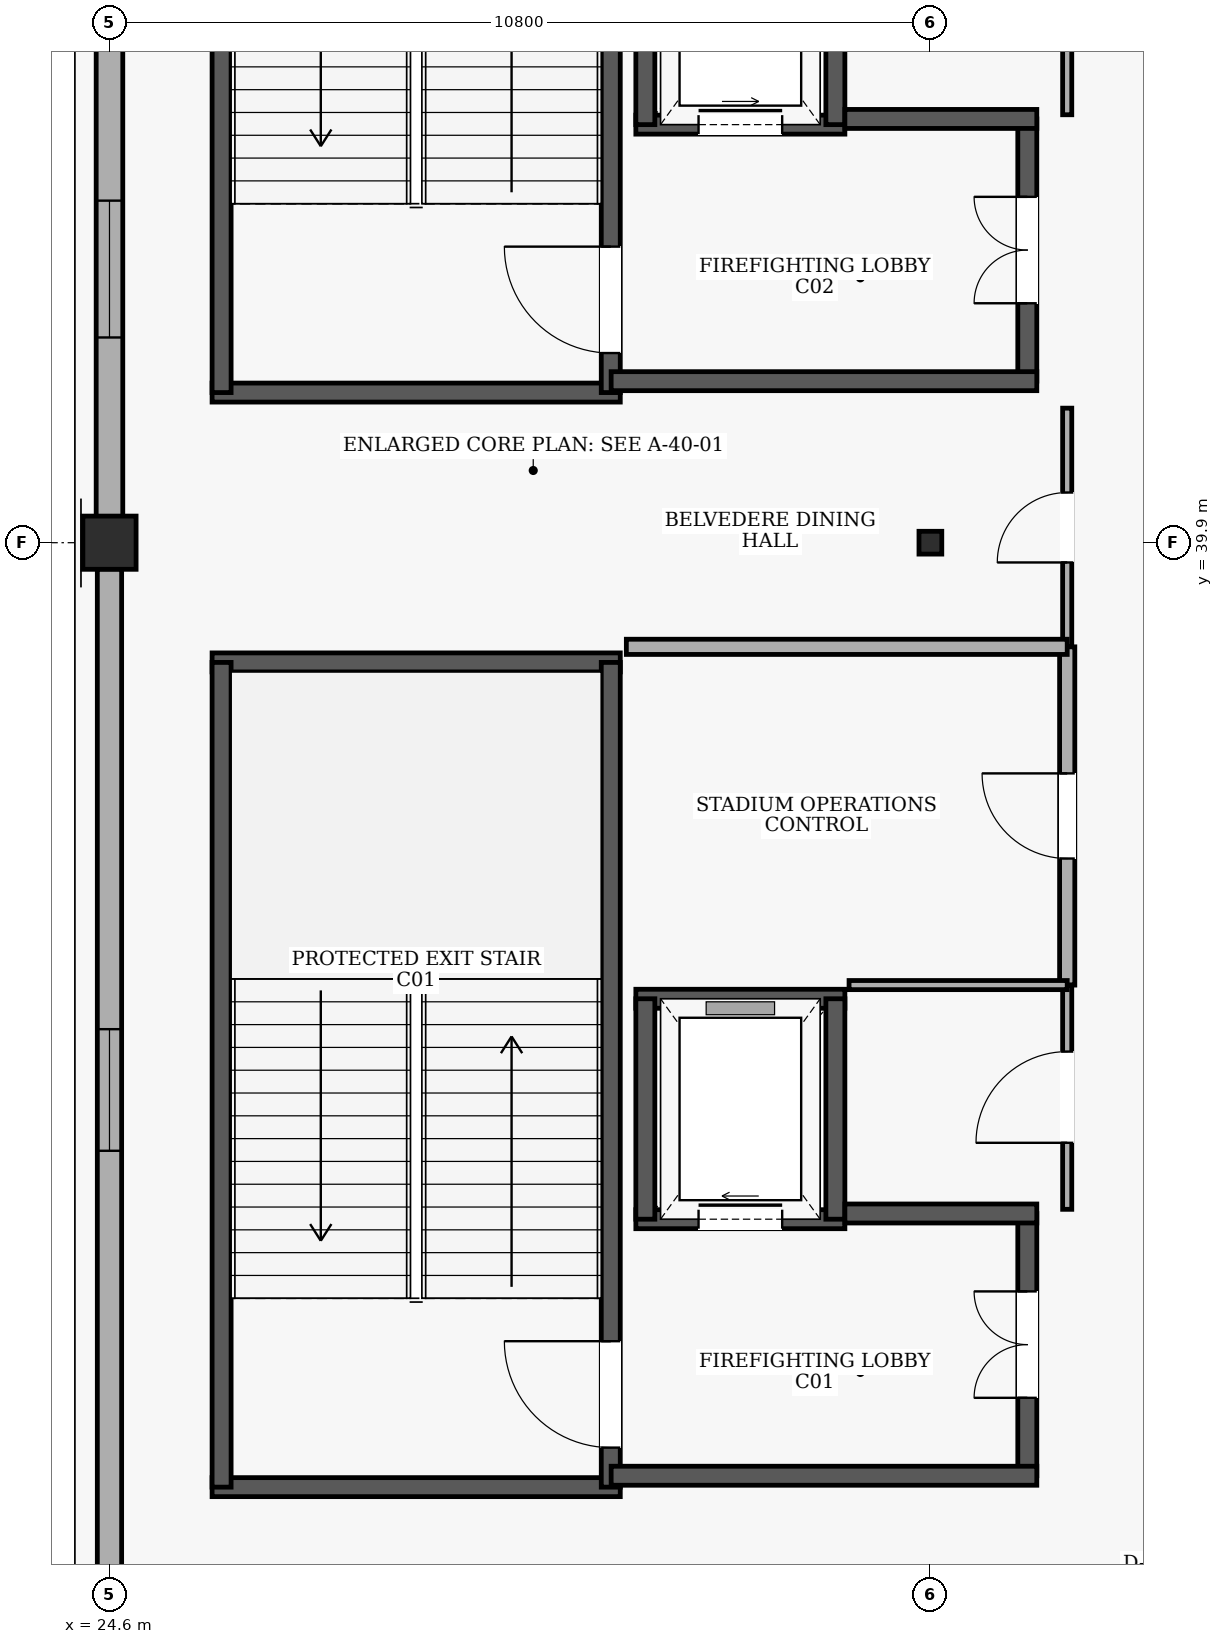
"""IFC4 building model, lengths in metres.
Left out: names, types, materials, properties, quantities, classifications, styles, units other than length and angle.
Written with IfcOpenShell. Run it as: python <this file> out.ifc"""

import sys

from ifc_helpers import new_model, si_unit, direction, frame, frame_2d, origin, origin_2d, place, context, subcontext, project, spatial, rectangle, hollow_rectangle, extrude, element, fill, save


model = new_model("IFC4")
c1 = context("Model", 3, precision=1e-05, world=origin(), true_north=direction((0.0, 1.0)))
c2 = subcontext(c1, "Body", "Model", "MODEL_VIEW")
j1 = project(units=[si_unit("LENGTHUNIT", "METRE"), si_unit("PLANEANGLEUNIT", "RADIAN")], contexts=[c1])
p1 = place(None, origin())
s1 = spatial("IfcSite", under=j1, at=p1, CompositionType="ELEMENT")
p2 = place(p1, origin())
s2 = spatial("IfcBuilding", under=s1, at=p2, CompositionType="ELEMENT")
p3 = place(p2, frame((0.0, 0.0, 24.6)))
s3 = spatial("IfcBuildingStorey", under=s2, at=p3, CompositionType="ELEMENT", Elevation=24.6)
p4 = place(p3, frame((24.6, 39.9, 0.0), z_axis=(0.0, 0.0, 1.0), x_axis=(1.0, 0.0, 0.0)))
e1 = element("IfcColumn", 1, at=p4, inside=s3, PredefinedType="COLUMN", context=c2, shape_type="SweptSolid", body=[
    extrude(rectangle(XDim=0.7, YDim=0.7, at=origin_2d()), origin(), (0.0, 0.0, 1.0), 4.8),
])
p5 = place(p3, frame((35.4, 39.9, 0.0), z_axis=(0.0, 0.0, 1.0), x_axis=(1.0, 0.0, 0.0)))
e2 = element("IfcColumn", 2, at=p5, inside=s3, PredefinedType="COLUMN", context=c2, shape_type="SweptSolid", body=[
    extrude(hollow_rectangle(XDim=0.3, YDim=0.3, WallThickness=0.016, at=origin_2d()), origin(), (0.0, 0.0, 1.0), 4.8),
])
p6 = place(p3, frame((24.6, 25.845, 0.0), z_axis=(0.0, 0.0, 1.0), x_axis=(0.0, 1.0, 0.0)))
e3 = element("IfcWall", 3, at=p6, inside=s3, PredefinedType="SOLIDWALL", context=c2, shape_type="SweptSolid", body=[
    extrude(rectangle(XDim=13.71, YDim=0.32, at=frame_2d((6.855, 0.0))), origin(), (0.0, 0.0, 1.0), 3.58),
])
p7 = place(p6, frame((6.055, 0.0, 0.9)))
e4 = element("IfcOpeningElement", 4, at=p7, cuts=e3, PredefinedType="OPENING", context=c2, shape_type="SweptSolid", body=[
    extrude(rectangle(XDim=1.6, YDim=1.5, at=frame_2d((0.8, 0.75))), frame((0.0, 0.17, 0.0), z_axis=(0.0, -1.0, 0.0), x_axis=(1.0, 0.0, 0.0)), (0.0, 0.0, 1.0), 0.34),
])
p8 = place(p3, frame((24.6, 40.245, 0.0), z_axis=(0.0, 0.0, 1.0), x_axis=(0.0, 1.0, 0.0)))
e5 = element("IfcWall", 5, at=p8, inside=s3, PredefinedType="SOLIDWALL", context=c2, shape_type="SweptSolid", body=[
    extrude(rectangle(XDim=6.51, YDim=0.35, at=frame_2d((3.255, 0.0))), origin(), (0.0, 0.0, 1.0), 3.88),
])
p9 = place(p8, frame((2.355, 0.0, 0.9)))
e6 = element("IfcOpeningElement", 6, at=p9, cuts=e5, PredefinedType="OPENING", context=c2, shape_type="SweptSolid", body=[
    extrude(rectangle(XDim=1.8, YDim=1.5, at=frame_2d((0.9, 0.75))), frame((0.0, 0.185, 0.0), z_axis=(0.0, -1.0, 0.0), x_axis=(1.0, 0.0, 0.0)), (0.0, 0.0, 1.0), 0.37),
])
for number, where, z_axis, x_axis in (
    (7, (25.95, 27.475, 0.0), (0.0, 0.0, 1.0), (1.0, 0.0, 0.0)),
    (8, (31.32, 38.325, 0.0), (0.0, 0.0, 1.0), (-1.0, 0.0, 0.0)),
):
    element("IfcWall", number, at=place(p3, frame(where, z_axis=z_axis, x_axis=x_axis)), inside=s3, PredefinedType="SHEAR", context=c2, shape_type="SweptSolid", body=[
        extrude(rectangle(XDim=5.37, YDim=0.25, at=frame_2d((2.685, 0.0))), origin(), (0.0, 0.0, 1.0), 4.5),
    ])
p10 = place(p3, frame((26.075, 27.475, 0.0), z_axis=(0.0, 0.0, 1.0), x_axis=(0.0, 1.0, 0.0)))
e9 = element("IfcWall", 9, at=p10, inside=s3, PredefinedType="SHEAR", context=c2, shape_type="SweptSolid", body=[
    extrude(rectangle(XDim=10.85, YDim=0.25, at=frame_2d((5.425, 0.0))), origin(), (0.0, 0.0, 1.0), 4.5),
])
p11 = place(p3, frame((31.195, 27.475, 0.0), z_axis=(0.0, 0.0, 1.0), x_axis=(0.0, 1.0, 0.0)))
e10 = element("IfcWall", 10, at=p11, inside=s3, PredefinedType="SHEAR", context=c2, shape_type="SweptSolid", body=[
    extrude(rectangle(XDim=10.85, YDim=0.25, at=frame_2d((5.425, 0.0))), origin(), (0.0, 0.0, 1.0), 4.5),
])
p12 = place(p11, frame((0.52, 0.0, 0.0)))
e11 = element("IfcOpeningElement", 11, at=p12, cuts=e10, PredefinedType="OPENING", context=c2, shape_type="SweptSolid", body=[
    extrude(rectangle(XDim=1.4, YDim=2.15, at=frame_2d((0.7, 1.075))), frame((0.0, 0.135, 0.0), z_axis=(0.0, -1.0, 0.0), x_axis=(1.0, 0.0, 0.0)), (0.0, 0.0, 1.0), 0.27),
])
p13 = place(p3, frame((25.95, 41.875, 0.0), z_axis=(0.0, 0.0, 1.0), x_axis=(1.0, 0.0, 0.0)))
e12 = element("IfcWall", 12, at=p13, inside=s3, PredefinedType="SHEAR", context=c2, shape_type="SweptSolid", body=[
    extrude(rectangle(XDim=5.37, YDim=0.25, at=frame_2d((2.685, 0.0))), origin(), (0.0, 0.0, 1.0), 4.5),
])
p14 = place(p3, frame((26.075, 41.875, 0.0), z_axis=(0.0, 0.0, 1.0), x_axis=(0.0, 1.0, 0.0)))
e13 = element("IfcWall", 13, at=p14, inside=s3, PredefinedType="SHEAR", context=c2, shape_type="SweptSolid", body=[
    extrude(rectangle(XDim=10.85, YDim=0.25, at=frame_2d((5.425, 0.0))), origin(), (0.0, 0.0, 1.0), 4.5),
])
p15 = place(p3, frame((31.195, 41.875, 0.0), z_axis=(0.0, 0.0, 1.0), x_axis=(0.0, 1.0, 0.0)))
e14 = element("IfcWall", 14, at=p15, inside=s3, PredefinedType="SHEAR", context=c2, shape_type="SweptSolid", body=[
    extrude(rectangle(XDim=10.85, YDim=0.25, at=frame_2d((5.425, 0.0))), origin(), (0.0, 0.0, 1.0), 4.5),
])
p16 = place(p15, frame((0.52, 0.0, 0.0)))
e15 = element("IfcOpeningElement", 15, at=p16, cuts=e14, PredefinedType="OPENING", context=c2, shape_type="SweptSolid", body=[
    extrude(rectangle(XDim=1.4, YDim=2.15, at=frame_2d((0.7, 1.075))), frame((0.0, 0.135, 0.0), z_axis=(0.0, -1.0, 0.0), x_axis=(1.0, 0.0, 0.0)), (0.0, 0.0, 1.0), 0.27),
])
p17 = place(p3, frame((31.525, 31.0, 0.0), z_axis=(0.0, 0.0, 1.0), x_axis=(1.0, 0.0, 0.0)))
e16 = element("IfcWall", 16, at=p17, inside=s3, PredefinedType="SHEAR", context=c2, shape_type="SweptSolid", body=[
    extrude(rectangle(XDim=2.75, YDim=0.25, at=frame_2d((1.375, 0.0))), origin(), (0.0, 0.0, 1.0), 4.5),
])
p18 = place(p17, frame((0.825, 0.0, 0.0)))
e17 = element("IfcOpeningElement", 17, at=p18, cuts=e16, PredefinedType="OPENING", context=c2, shape_type="SweptSolid", body=[
    extrude(rectangle(XDim=1.1, YDim=2.15, at=frame_2d((0.55, 1.075))), frame((0.0, 0.135, 0.0), z_axis=(0.0, -1.0, 0.0), x_axis=(1.0, 0.0, 0.0)), (0.0, 0.0, 1.0), 0.27),
])
p19 = place(p3, frame((34.275, 33.9, 0.0), z_axis=(0.0, 0.0, 1.0), x_axis=(-1.0, 0.0, 0.0)))
e18 = element("IfcWall", 18, at=p19, inside=s3, PredefinedType="SHEAR", context=c2, shape_type="SweptSolid", body=[
    extrude(rectangle(XDim=2.75, YDim=0.25, at=frame_2d((1.375, 0.0))), origin(), (0.0, 0.0, 1.0), 4.5),
])
for number, where, z_axis, x_axis in (
    (19, (31.65, 33.9, 0.0), (0.0, 0.0, 1.0), (0.0, -1.0, 0.0)),
    (20, (34.15, 31.0, 0.0), (0.0, 0.0, 1.0), (0.0, 1.0, 0.0)),
):
    element("IfcWall", number, at=place(p3, frame(where, z_axis=z_axis, x_axis=x_axis)), inside=s3, PredefinedType="SHEAR", context=c2, shape_type="SweptSolid", body=[
        extrude(rectangle(XDim=2.9, YDim=0.25, at=frame_2d((1.45, 0.0))), origin(), (0.0, 0.0, 1.0), 4.5),
    ])
p20 = place(p3, frame((36.675, 27.625, 0.0), z_axis=(0.0, 0.0, 1.0), x_axis=(0.0, 1.0, 0.0)))
e21 = element("IfcWall", 21, at=p20, inside=s3, PredefinedType="SHEAR", context=c2, shape_type="SweptSolid", body=[
    extrude(rectangle(XDim=3.45, YDim=0.25, at=frame_2d((1.725, 0.0))), origin(), (0.0, 0.0, 1.0), 4.5),
])
p21 = place(p20, frame((1.025, 0.0, 0.0)))
e22 = element("IfcOpeningElement", 22, at=p21, cuts=e21, PredefinedType="OPENING", context=c2, shape_type="SweptSolid", body=[
    extrude(rectangle(XDim=1.4, YDim=2.15, at=frame_2d((0.7, 1.075))), frame((0.0, 0.135, 0.0), z_axis=(0.0, -1.0, 0.0), x_axis=(1.0, 0.0, 0.0)), (0.0, 0.0, 1.0), 0.27),
])
p22 = place(p3, frame((34.275, 31.075, 0.0), z_axis=(0.0, 0.0, 1.0), x_axis=(1.0, 0.0, 0.0)))
e23 = element("IfcWall", 23, at=p22, inside=s3, PredefinedType="SHEAR", context=c2, shape_type="SweptSolid", body=[
    extrude(rectangle(XDim=2.525, YDim=0.25, at=frame_2d((1.263, 0.0))), origin(), (0.0, 0.0, 1.0), 4.5),
])
p23 = place(p3, frame((31.2, 27.625, 0.0), z_axis=(0.0, 0.0, 1.0), x_axis=(1.0, 0.0, 0.0)))
e24 = element("IfcWall", 24, at=p23, inside=s3, PredefinedType="SHEAR", context=c2, shape_type="SweptSolid", body=[
    extrude(rectangle(XDim=5.6, YDim=0.25, at=frame_2d((2.8, 0.0))), origin(), (0.0, 0.0, 1.0), 4.5),
])
p24 = place(p3, frame((31.525, 45.4, 0.0), z_axis=(0.0, 0.0, 1.0), x_axis=(1.0, 0.0, 0.0)))
e25 = element("IfcWall", 25, at=p24, inside=s3, PredefinedType="SHEAR", context=c2, shape_type="SweptSolid", body=[
    extrude(rectangle(XDim=2.75, YDim=0.25, at=frame_2d((1.375, 0.0))), origin(), (0.0, 0.0, 1.0), 4.5),
])
p25 = place(p24, frame((0.825, 0.0, 0.0)))
e26 = element("IfcOpeningElement", 26, at=p25, cuts=e25, PredefinedType="OPENING", context=c2, shape_type="SweptSolid", body=[
    extrude(rectangle(XDim=1.1, YDim=2.15, at=frame_2d((0.55, 1.075))), frame((0.0, 0.135, 0.0), z_axis=(0.0, -1.0, 0.0), x_axis=(1.0, 0.0, 0.0)), (0.0, 0.0, 1.0), 0.27),
])
for number, where, z_axis, x_axis in (
    (27, (31.65, 48.3, 0.0), (0.0, 0.0, 1.0), (0.0, -1.0, 0.0)),
    (28, (34.15, 45.4, 0.0), (0.0, 0.0, 1.0), (0.0, 1.0, 0.0)),
):
    element("IfcWall", number, at=place(p3, frame(where, z_axis=z_axis, x_axis=x_axis)), inside=s3, PredefinedType="SHEAR", context=c2, shape_type="SweptSolid", body=[
        extrude(rectangle(XDim=2.9, YDim=0.25, at=frame_2d((1.45, 0.0))), origin(), (0.0, 0.0, 1.0), 4.5),
    ])
p26 = place(p3, frame((36.675, 42.025, 0.0), z_axis=(0.0, 0.0, 1.0), x_axis=(0.0, 1.0, 0.0)))
e29 = element("IfcWall", 29, at=p26, inside=s3, PredefinedType="SHEAR", context=c2, shape_type="SweptSolid", body=[
    extrude(rectangle(XDim=3.45, YDim=0.25, at=frame_2d((1.725, 0.0))), origin(), (0.0, 0.0, 1.0), 4.5),
])
p27 = place(p26, frame((1.025, 0.0, 0.0)))
e30 = element("IfcOpeningElement", 30, at=p27, cuts=e29, PredefinedType="OPENING", context=c2, shape_type="SweptSolid", body=[
    extrude(rectangle(XDim=1.4, YDim=2.15, at=frame_2d((0.7, 1.075))), frame((0.0, 0.135, 0.0), z_axis=(0.0, -1.0, 0.0), x_axis=(1.0, 0.0, 0.0)), (0.0, 0.0, 1.0), 0.27),
])
p28 = place(p3, frame((34.275, 45.475, 0.0), z_axis=(0.0, 0.0, 1.0), x_axis=(1.0, 0.0, 0.0)))
e31 = element("IfcWall", 31, at=p28, inside=s3, PredefinedType="SHEAR", context=c2, shape_type="SweptSolid", body=[
    extrude(rectangle(XDim=2.525, YDim=0.25, at=frame_2d((1.263, 0.0))), origin(), (0.0, 0.0, 1.0), 4.5),
])
p29 = place(p3, frame((31.2, 42.025, 0.0), z_axis=(0.0, 0.0, 1.0), x_axis=(1.0, 0.0, 0.0)))
e32 = element("IfcWall", 32, at=p29, inside=s3, PredefinedType="SHEAR", context=c2, shape_type="SweptSolid", body=[
    extrude(rectangle(XDim=5.6, YDim=0.25, at=frame_2d((2.8, 0.0))), origin(), (0.0, 0.0, 1.0), 4.5),
])
p30 = place(p3, frame((37.2, 38.53, 0.0), z_axis=(0.0, 0.0, 1.0), x_axis=(0.0, 1.0, 0.0)))
e33 = element("IfcWall", 33, at=p30, inside=s3, PredefinedType="PARTITIONING", context=c2, shape_type="SweptSolid", body=[
    extrude(rectangle(XDim=3.14, YDim=0.12, at=frame_2d((1.57, 0.0))), origin(), (0.0, 0.0, 1.0), 4.5),
])
p31 = place(p30, frame((1.11, 0.0, 0.0)))
e34 = element("IfcOpeningElement", 34, at=p31, cuts=e33, PredefinedType="OPENING", context=c2, shape_type="SweptSolid", body=[
    extrude(rectangle(XDim=0.92, YDim=2.1, at=frame_2d((0.46, 1.05))), frame((0.0, 0.07, 0.0), z_axis=(0.0, -1.0, 0.0), x_axis=(1.0, 0.0, 0.0)), (0.0, 0.0, 1.0), 0.14),
])
p32 = place(p3, frame((37.2, 34.08, 0.0), z_axis=(0.0, 0.0, 1.0), x_axis=(0.0, 1.0, 0.0)))
e35 = element("IfcWall", 35, at=p32, inside=s3, PredefinedType="PARTITIONING", context=c2, shape_type="SweptSolid", body=[
    extrude(rectangle(XDim=4.45, YDim=0.2, at=frame_2d((2.225, 0.0))), origin(), (0.0, 0.0, 1.0), 4.5),
])
p33 = place(p32, frame((1.665, 0.0, 0.0)))
e36 = element("IfcOpeningElement", 36, at=p33, cuts=e35, PredefinedType="OPENING", context=c2, shape_type="SweptSolid", body=[
    extrude(rectangle(XDim=1.12, YDim=2.15, at=frame_2d((0.56, 1.075))), frame((0.0, 0.11, 0.0), z_axis=(0.0, -1.0, 0.0), x_axis=(1.0, 0.0, 0.0)), (0.0, 0.0, 1.0), 0.22),
])
p34 = place(p3, frame((37.2, 38.53, 0.0), z_axis=(0.0, 0.0, 1.0), x_axis=(-1.0, 0.0, 0.0)))
e37 = element("IfcWall", 37, at=p34, inside=s3, PredefinedType="PARTITIONING", context=c2, shape_type="SweptSolid", body=[
    extrude(rectangle(XDim=5.8, YDim=0.2, at=frame_2d((2.9, 0.0))), origin(), (0.0, 0.0, 1.0), 4.5),
])
p35 = place(p3, frame((37.2, 31.13, 0.0), z_axis=(0.0, 0.0, 1.0), x_axis=(0.0, 1.0, 0.0)))
e38 = element("IfcWall", 38, at=p35, inside=s3, PredefinedType="PARTITIONING", context=c2, shape_type="SweptSolid", body=[
    extrude(rectangle(XDim=2.95, YDim=0.12, at=frame_2d((1.475, 0.0))), origin(), (0.0, 0.0, 1.0), 4.5),
])
p36 = place(p35, frame((0.875, 0.0, 0.0)))
e39 = element("IfcOpeningElement", 39, at=p36, cuts=e38, PredefinedType="OPENING", context=c2, shape_type="SweptSolid", body=[
    extrude(rectangle(XDim=1.2, YDim=2.15, at=frame_2d((0.6, 1.075))), frame((0.0, 0.07, 0.0), z_axis=(0.0, -1.0, 0.0), x_axis=(1.0, 0.0, 0.0)), (0.0, 0.0, 1.0), 0.14),
])
p37 = place(p3, frame((37.2, 34.08, 0.0), z_axis=(0.0, 0.0, 1.0), x_axis=(-1.0, 0.0, 0.0)))
e40 = element("IfcWall", 40, at=p37, inside=s3, PredefinedType="PARTITIONING", context=c2, shape_type="SweptSolid", body=[
    extrude(rectangle(XDim=2.87, YDim=0.12, at=frame_2d((1.435, 0.0))), origin(), (0.0, 0.0, 1.0), 4.5),
])
p38 = place(p3, frame((37.2, 45.53, 0.0), z_axis=(0.0, 0.0, 1.0), x_axis=(0.0, 1.0, 0.0)))
e41 = element("IfcWall", 41, at=p38, inside=s3, PredefinedType="PARTITIONING", context=c2, shape_type="SweptSolid", body=[
    extrude(rectangle(XDim=2.95, YDim=0.12, at=frame_2d((1.475, 0.0))), origin(), (0.0, 0.0, 1.0), 4.5),
])
p39 = place(p38, frame((1.015, 0.0, 0.0)))
e42 = element("IfcOpeningElement", 42, at=p39, cuts=e41, PredefinedType="OPENING", context=c2, shape_type="SweptSolid", body=[
    extrude(rectangle(XDim=0.92, YDim=2.1, at=frame_2d((0.46, 1.05))), frame((0.0, 0.07, 0.0), z_axis=(0.0, -1.0, 0.0), x_axis=(1.0, 0.0, 0.0)), (0.0, 0.0, 1.0), 0.14),
])
p40 = place(p7, origin())
e43 = element("IfcWindow", 43, at=p40, inside=s3, PartitioningType="SINGLE_PANEL", PredefinedType="WINDOW", context=c2, shape_type="SweptSolid", body=[
    extrude(rectangle(XDim=1.6, YDim=1.5, at=frame_2d((0.8, 0.75))), frame((0.0, 0.03, 0.0), z_axis=(0.0, -1.0, 0.0), x_axis=(1.0, 0.0, 0.0)), (0.0, 0.0, 1.0), 0.06),
])
fill(e4, e43)
p41 = place(p9, origin())
e44 = element("IfcWindow", 44, at=p41, inside=s3, PartitioningType="SINGLE_PANEL", PredefinedType="WINDOW", context=c2, shape_type="SweptSolid", body=[
    extrude(rectangle(XDim=1.8, YDim=1.5, at=frame_2d((0.9, 0.75))), frame((0.0, 0.03, 0.0), z_axis=(0.0, -1.0, 0.0), x_axis=(1.0, 0.0, 0.0)), (0.0, 0.0, 1.0), 0.06),
])
fill(e6, e44)
p42 = place(p12, origin())
e45 = element("IfcDoor", 45, at=p42, inside=s3, OperationType="SINGLE_SWING_RIGHT", PredefinedType="DOOR", context=c2, shape_type="SweptSolid", body=[
    extrude(rectangle(XDim=1.4, YDim=2.15, at=frame_2d((0.7, 1.075))), frame((0.0, 0.025, 0.0), z_axis=(0.0, -1.0, 0.0), x_axis=(1.0, 0.0, 0.0)), (0.0, 0.0, 1.0), 0.05),
])
fill(e11, e45)
p43 = place(p16, origin())
e46 = element("IfcDoor", 46, at=p43, inside=s3, OperationType="SINGLE_SWING_RIGHT", PredefinedType="DOOR", context=c2, shape_type="SweptSolid", body=[
    extrude(rectangle(XDim=1.4, YDim=2.15, at=frame_2d((0.7, 1.075))), frame((0.0, 0.025, 0.0), z_axis=(0.0, -1.0, 0.0), x_axis=(1.0, 0.0, 0.0)), (0.0, 0.0, 1.0), 0.05),
])
fill(e15, e46)
p44 = place(p18, origin())
e47 = element("IfcDoor", 47, at=p44, inside=s3, OperationType="SLIDING_TO_RIGHT", PredefinedType="DOOR", context=c2, shape_type="SweptSolid", body=[
    extrude(rectangle(XDim=1.1, YDim=2.15, at=frame_2d((0.55, 1.075))), frame((0.0, 0.025, 0.0), z_axis=(0.0, -1.0, 0.0), x_axis=(1.0, 0.0, 0.0)), (0.0, 0.0, 1.0), 0.05),
])
fill(e17, e47)
p45 = place(p21, origin())
e48 = element("IfcDoor", 48, at=p45, inside=s3, OperationType="DOUBLE_DOOR_SINGLE_SWING", PredefinedType="DOOR", context=c2, shape_type="SweptSolid", body=[
    extrude(rectangle(XDim=1.4, YDim=2.15, at=frame_2d((0.7, 1.075))), frame((0.0, 0.025, 0.0), z_axis=(0.0, -1.0, 0.0), x_axis=(1.0, 0.0, 0.0)), (0.0, 0.0, 1.0), 0.05),
])
fill(e22, e48)
p46 = place(p25, origin())
e49 = element("IfcDoor", 49, at=p46, inside=s3, OperationType="SLIDING_TO_LEFT", PredefinedType="DOOR", context=c2, shape_type="SweptSolid", body=[
    extrude(rectangle(XDim=1.1, YDim=2.15, at=frame_2d((0.55, 1.075))), frame((0.0, 0.025, 0.0), z_axis=(0.0, -1.0, 0.0), x_axis=(1.0, 0.0, 0.0)), (0.0, 0.0, 1.0), 0.05),
])
fill(e26, e49)
p47 = place(p27, origin())
e50 = element("IfcDoor", 50, at=p47, inside=s3, OperationType="DOUBLE_DOOR_SINGLE_SWING", PredefinedType="DOOR", context=c2, shape_type="SweptSolid", body=[
    extrude(rectangle(XDim=1.4, YDim=2.15, at=frame_2d((0.7, 1.075))), frame((0.0, 0.025, 0.0), z_axis=(0.0, -1.0, 0.0), x_axis=(1.0, 0.0, 0.0)), (0.0, 0.0, 1.0), 0.05),
])
fill(e30, e50)
p48 = place(p31, origin())
e51 = element("IfcDoor", 51, at=p48, inside=s3, OperationType="SINGLE_SWING_LEFT", PredefinedType="DOOR", context=c2, shape_type="SweptSolid", body=[
    extrude(rectangle(XDim=0.92, YDim=2.1, at=frame_2d((0.46, 1.05))), frame((0.0, 0.025, 0.0), z_axis=(0.0, -1.0, 0.0), x_axis=(1.0, 0.0, 0.0)), (0.0, 0.0, 1.0), 0.05),
])
fill(e34, e51)
p49 = place(p33, origin())
e52 = element("IfcDoor", 52, at=p49, inside=s3, OperationType="SINGLE_SWING_RIGHT", PredefinedType="DOOR", context=c2, shape_type="SweptSolid", body=[
    extrude(rectangle(XDim=1.12, YDim=2.15, at=frame_2d((0.56, 1.075))), frame((0.0, 0.025, 0.0), z_axis=(0.0, -1.0, 0.0), x_axis=(1.0, 0.0, 0.0)), (0.0, 0.0, 1.0), 0.05),
])
fill(e36, e52)
p50 = place(p36, origin())
e53 = element("IfcDoor", 53, at=p50, inside=s3, OperationType="SINGLE_SWING_LEFT", PredefinedType="DOOR", context=c2, shape_type="SweptSolid", body=[
    extrude(rectangle(XDim=1.2, YDim=2.15, at=frame_2d((0.6, 1.075))), frame((0.0, 0.025, 0.0), z_axis=(0.0, -1.0, 0.0), x_axis=(1.0, 0.0, 0.0)), (0.0, 0.0, 1.0), 0.05),
])
fill(e39, e53)
save(model, sys.argv[1])
